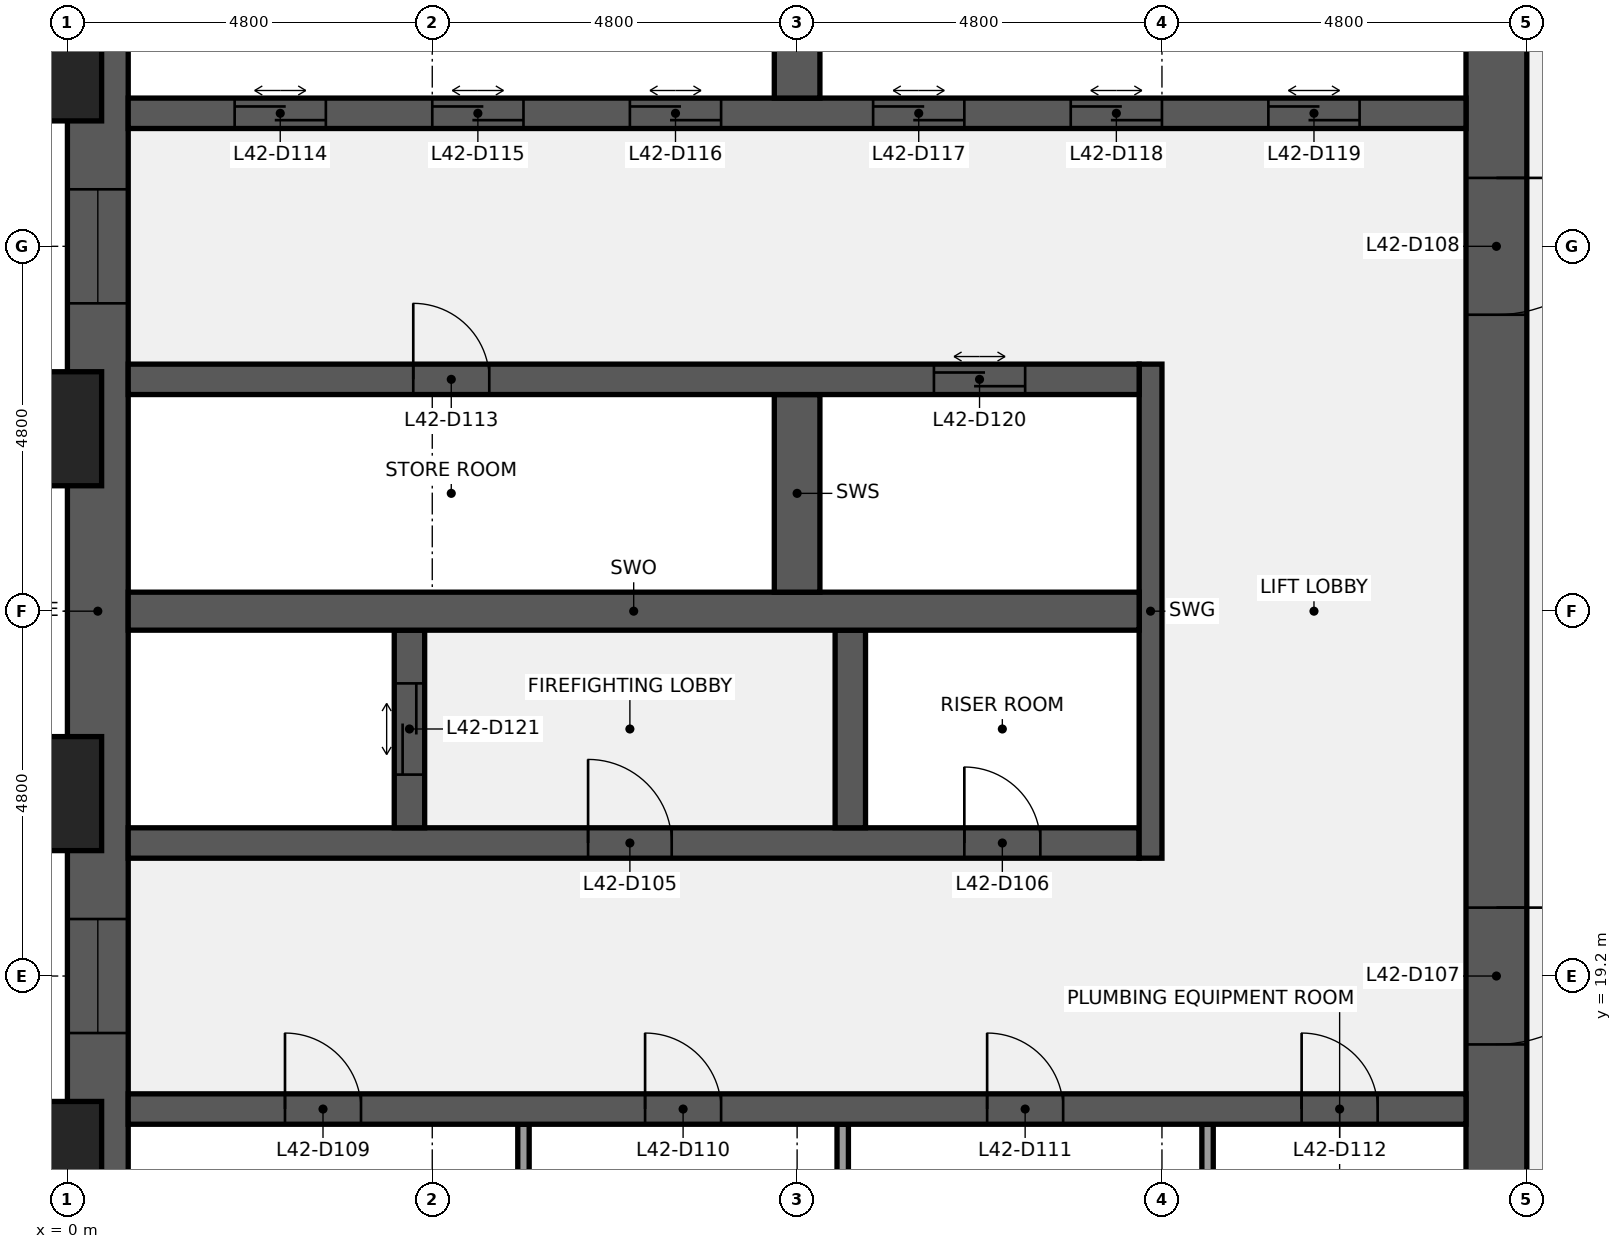
"""IFC4 building model, lengths in metres.
Left out: names, types, materials, properties, quantities, classifications, styles, units other than length and angle.
Written with IfcOpenShell. Run it as: python <this file> out.ifc"""

import sys

from ifc_helpers import new_model, si_unit, direction, frame, frame_2d, origin, origin_2d, place, context, subcontext, project, spatial, rectangle, extrude, element, fill, save


model = new_model("IFC4")
c1 = context("Model", 3, precision=1e-05, world=origin(), true_north=direction((0.0, 1.0)))
c2 = subcontext(c1, "Body", "Model", "MODEL_VIEW")
j1 = project(units=[si_unit("LENGTHUNIT", "METRE"), si_unit("PLANEANGLEUNIT", "RADIAN")], contexts=[c1])
p1 = place(None, origin())
s1 = spatial("IfcSite", under=j1, at=p1, CompositionType="ELEMENT")
p2 = place(p1, origin())
s2 = spatial("IfcBuilding", under=s1, at=p2, CompositionType="ELEMENT")
p3 = place(p2, frame((0.0, 0.0, 197.2)))
s3 = spatial("IfcBuildingStorey", under=s2, at=p3, CompositionType="ELEMENT", Elevation=197.2)
p4 = place(p3, frame((0.4, 9.6, 0.0), z_axis=(0.0, 0.0, 1.0), x_axis=(0.0, 1.0, 0.0)))
e1 = element("IfcWall", 1, at=p4, inside=s3, PredefinedType="SHEAR", context=c2, shape_type="SweptSolid", body=[
    extrude(rectangle(XDim=28.8, YDim=0.8, at=frame_2d((14.4, 0.0))), origin(), (0.0, 0.0, 1.0), 3.84),
])
p5 = place(p4, frame((8.85, 0.0, 0.9)))
e2 = element("IfcOpeningElement", 2, at=p5, cuts=e1, PredefinedType="OPENING", context=c2, shape_type="SweptSolid", body=[
    extrude(rectangle(XDim=1.5, YDim=1.5, at=frame_2d((0.75, 0.75))), frame((0.0, 0.41, 0.0), z_axis=(0.0, -1.0, 0.0), x_axis=(1.0, 0.0, 0.0)), (0.0, 0.0, 1.0), 0.82),
])
p6 = place(p4, frame((18.45, 0.0, 0.9)))
e3 = element("IfcOpeningElement", 3, at=p6, cuts=e1, PredefinedType="OPENING", context=c2, shape_type="SweptSolid", body=[
    extrude(rectangle(XDim=1.5, YDim=1.5, at=frame_2d((0.75, 0.75))), frame((0.0, 0.41, 0.0), z_axis=(0.0, -1.0, 0.0), x_axis=(1.0, 0.0, 0.0)), (0.0, 0.0, 1.0), 0.82),
])
p7 = place(p3, frame((18.8, 38.4, 0.0), z_axis=(0.0, 0.0, 1.0), x_axis=(0.0, -1.0, 0.0)))
e4 = element("IfcWall", 4, at=p7, inside=s3, PredefinedType="SHEAR", context=c2, shape_type="SweptSolid", body=[
    extrude(rectangle(XDim=28.8, YDim=0.8, at=frame_2d((14.4, 0.0))), origin(), (0.0, 0.0, 1.0), 3.84),
])
p8 = place(p7, frame((18.3, 0.0, 0.0)))
e5 = element("IfcOpeningElement", 5, at=p8, cuts=e4, PredefinedType="OPENING", context=c2, shape_type="SweptSolid", body=[
    extrude(rectangle(XDim=1.8, YDim=2.1, at=frame_2d((0.9, 1.05))), frame((0.0, 0.41, 0.0), z_axis=(0.0, -1.0, 0.0), x_axis=(1.0, 0.0, 0.0)), (0.0, 0.0, 1.0), 0.82),
])
p9 = place(p7, frame((8.7, 0.0, 0.0)))
e6 = element("IfcOpeningElement", 6, at=p9, cuts=e4, PredefinedType="OPENING", context=c2, shape_type="SweptSolid", body=[
    extrude(rectangle(XDim=1.8, YDim=2.1, at=frame_2d((0.9, 1.05))), frame((0.0, 0.41, 0.0), z_axis=(0.0, -1.0, 0.0), x_axis=(1.0, 0.0, 0.0)), (0.0, 0.0, 1.0), 0.82),
])
for number, where, z_axis, x_axis in (
    (7, (6.0, 14.65, 0.0), (0.0, 0.0, 1.0), (0.0, 1.0, 0.0)),
    (8, (10.2, 14.65, 0.0), (0.0, 0.0, 1.0), (0.0, 1.0, 0.0)),
    (9, (15.0, 14.65, 0.0), (0.0, 0.0, 1.0), (0.0, 1.0, 0.0)),
):
    element("IfcWall", number, at=place(p3, frame(where, z_axis=z_axis, x_axis=x_axis)), inside=s3, PredefinedType="PARTITIONING", context=c2, shape_type="SweptSolid", body=[
        extrude(rectangle(XDim=2.6, YDim=0.15, at=frame_2d((1.3, 0.0))), origin(), (0.0, 0.0, 1.0), 3.84),
    ])
p10 = place(p3, frame((0.8, 17.45, 0.0), z_axis=(0.0, 0.0, 1.0), x_axis=(1.0, 0.0, 0.0)))
e10 = element("IfcWall", 10, at=p10, inside=s3, PredefinedType="SHEAR", context=c2, shape_type="SweptSolid", body=[
    extrude(rectangle(XDim=17.6, YDim=0.4, at=frame_2d((8.8, 0.0))), origin(), (0.0, 0.0, 1.0), 3.84),
])
p11 = place(p10, frame((2.062, 0.0, 0.0)))
e11 = element("IfcOpeningElement", 11, at=p11, cuts=e10, PredefinedType="OPENING", context=c2, shape_type="SweptSolid", body=[
    extrude(rectangle(XDim=1.0, YDim=2.1, at=frame_2d((0.5, 1.05))), frame((0.0, 0.21, 0.0), z_axis=(0.0, -1.0, 0.0), x_axis=(1.0, 0.0, 0.0)), (0.0, 0.0, 1.0), 0.42),
])
p12 = place(p10, frame((6.8, 0.0, 0.0)))
e12 = element("IfcOpeningElement", 12, at=p12, cuts=e10, PredefinedType="OPENING", context=c2, shape_type="SweptSolid", body=[
    extrude(rectangle(XDim=1.0, YDim=2.1, at=frame_2d((0.5, 1.05))), frame((0.0, 0.21, 0.0), z_axis=(0.0, -1.0, 0.0), x_axis=(1.0, 0.0, 0.0)), (0.0, 0.0, 1.0), 0.42),
])
p13 = place(p10, frame((11.3, 0.0, 0.0)))
e13 = element("IfcOpeningElement", 13, at=p13, cuts=e10, PredefinedType="OPENING", context=c2, shape_type="SweptSolid", body=[
    extrude(rectangle(XDim=1.0, YDim=2.1, at=frame_2d((0.5, 1.05))), frame((0.0, 0.21, 0.0), z_axis=(0.0, -1.0, 0.0), x_axis=(1.0, 0.0, 0.0)), (0.0, 0.0, 1.0), 0.42),
])
p14 = place(p10, frame((15.438, 0.0, 0.0)))
e14 = element("IfcOpeningElement", 14, at=p14, cuts=e10, PredefinedType="OPENING", context=c2, shape_type="SweptSolid", body=[
    extrude(rectangle(XDim=1.0, YDim=2.1, at=frame_2d((0.5, 1.05))), frame((0.0, 0.21, 0.0), z_axis=(0.0, -1.0, 0.0), x_axis=(1.0, 0.0, 0.0)), (0.0, 0.0, 1.0), 0.42),
])
p15 = place(p3, frame((0.8, 20.95, 0.0), z_axis=(0.0, 0.0, 1.0), x_axis=(1.0, 0.0, 0.0)))
e15 = element("IfcWall", 15, at=p15, inside=s3, PredefinedType="SHEAR", context=c2, shape_type="SweptSolid", body=[
    extrude(rectangle(XDim=13.3, YDim=0.4, at=frame_2d((6.65, 0.0))), origin(), (0.0, 0.0, 1.0), 3.84),
])
p16 = place(p15, frame((6.05, 0.0, 0.0)))
e16 = element("IfcOpeningElement", 16, at=p16, cuts=e15, PredefinedType="OPENING", context=c2, shape_type="SweptSolid", body=[
    extrude(rectangle(XDim=1.1, YDim=2.1, at=frame_2d((0.55, 1.05))), frame((0.0, 0.21, 0.0), z_axis=(0.0, -1.0, 0.0), x_axis=(1.0, 0.0, 0.0)), (0.0, 0.0, 1.0), 0.42),
])
p17 = place(p15, frame((11.0, 0.0, 0.0)))
e17 = element("IfcOpeningElement", 17, at=p17, cuts=e15, PredefinedType="OPENING", context=c2, shape_type="SweptSolid", body=[
    extrude(rectangle(XDim=1.0, YDim=2.1, at=frame_2d((0.5, 1.05))), frame((0.0, 0.21, 0.0), z_axis=(0.0, -1.0, 0.0), x_axis=(1.0, 0.0, 0.0)), (0.0, 0.0, 1.0), 0.42),
])
p18 = place(p3, frame((14.25, 20.75, 0.0), z_axis=(0.0, 0.0, 1.0), x_axis=(0.0, 1.0, 0.0)))
e18 = element("IfcWall", 18, at=p18, inside=s3, PredefinedType="SHEAR", context=c2, shape_type="SweptSolid", body=[
    extrude(rectangle(XDim=6.5, YDim=0.3, at=frame_2d((3.25, 0.0))), origin(), (0.0, 0.0, 1.0), 3.84),
])
p19 = place(p3, frame((4.5, 21.15, 0.0), z_axis=(0.0, 0.0, 1.0), x_axis=(0.0, 1.0, 0.0)))
e19 = element("IfcWall", 19, at=p19, inside=s3, PredefinedType="SHEAR", context=c2, shape_type="SweptSolid", body=[
    extrude(rectangle(XDim=2.6, YDim=0.4, at=frame_2d((1.3, 0.0))), origin(), (0.0, 0.0, 1.0), 3.84),
])
p20 = place(p19, frame((0.7, 0.0, 0.0)))
e20 = element("IfcOpeningElement", 20, at=p20, cuts=e19, PredefinedType="OPENING", context=c2, shape_type="SweptSolid", body=[
    extrude(rectangle(XDim=1.2, YDim=2.1, at=frame_2d((0.6, 1.05))), frame((0.0, 0.21, 0.0), z_axis=(0.0, -1.0, 0.0), x_axis=(1.0, 0.0, 0.0)), (0.0, 0.0, 1.0), 0.42),
])
p21 = place(p3, frame((10.3, 21.15, 0.0), z_axis=(0.0, 0.0, 1.0), x_axis=(0.0, 1.0, 0.0)))
e21 = element("IfcWall", 21, at=p21, inside=s3, PredefinedType="SHEAR", context=c2, shape_type="SweptSolid", body=[
    extrude(rectangle(XDim=2.6, YDim=0.4, at=frame_2d((1.3, 0.0))), origin(), (0.0, 0.0, 1.0), 3.84),
])
p22 = place(p3, frame((0.8, 24.0, 0.0), z_axis=(0.0, 0.0, 1.0), x_axis=(1.0, 0.0, 0.0)))
e22 = element("IfcWall", 22, at=p22, inside=s3, PredefinedType="SHEAR", context=c2, shape_type="SweptSolid", body=[
    extrude(rectangle(XDim=13.3, YDim=0.5, at=frame_2d((6.65, 0.0))), origin(), (0.0, 0.0, 1.0), 3.84),
])
p23 = place(p3, frame((9.6, 24.25, 0.0), z_axis=(0.0, 0.0, 1.0), x_axis=(0.0, 1.0, 0.0)))
e23 = element("IfcWall", 23, at=p23, inside=s3, PredefinedType="SHEAR", context=c2, shape_type="SweptSolid", body=[
    extrude(rectangle(XDim=2.6, YDim=0.6, at=frame_2d((1.3, 0.0))), origin(), (0.0, 0.0, 1.0), 3.84),
])
p24 = place(p3, frame((0.8, 27.05, 0.0), z_axis=(0.0, 0.0, 1.0), x_axis=(1.0, 0.0, 0.0)))
e24 = element("IfcWall", 24, at=p24, inside=s3, PredefinedType="SHEAR", context=c2, shape_type="SweptSolid", body=[
    extrude(rectangle(XDim=13.3, YDim=0.4, at=frame_2d((6.65, 0.0))), origin(), (0.0, 0.0, 1.0), 3.84),
])
p25 = place(p24, frame((3.75, 0.0, 0.0)))
e25 = element("IfcOpeningElement", 25, at=p25, cuts=e24, PredefinedType="OPENING", context=c2, shape_type="SweptSolid", body=[
    extrude(rectangle(XDim=1.0, YDim=2.1, at=frame_2d((0.5, 1.05))), frame((0.0, 0.21, 0.0), z_axis=(0.0, -1.0, 0.0), x_axis=(1.0, 0.0, 0.0)), (0.0, 0.0, 1.0), 0.42),
])
p26 = place(p24, frame((10.6, 0.0, 0.0)))
e26 = element("IfcOpeningElement", 26, at=p26, cuts=e24, PredefinedType="OPENING", context=c2, shape_type="SweptSolid", body=[
    extrude(rectangle(XDim=1.2, YDim=2.1, at=frame_2d((0.6, 1.05))), frame((0.0, 0.21, 0.0), z_axis=(0.0, -1.0, 0.0), x_axis=(1.0, 0.0, 0.0)), (0.0, 0.0, 1.0), 0.42),
])
p27 = place(p3, frame((0.8, 30.55, 0.0), z_axis=(0.0, 0.0, 1.0), x_axis=(1.0, 0.0, 0.0)))
e27 = element("IfcWall", 27, at=p27, inside=s3, PredefinedType="SHEAR", context=c2, shape_type="SweptSolid", body=[
    extrude(rectangle(XDim=17.6, YDim=0.4, at=frame_2d((8.8, 0.0))), origin(), (0.0, 0.0, 1.0), 3.84),
])
p28 = place(p27, frame((1.4, 0.0, 0.0)))
e28 = element("IfcOpeningElement", 28, at=p28, cuts=e27, PredefinedType="OPENING", context=c2, shape_type="SweptSolid", body=[
    extrude(rectangle(XDim=1.2, YDim=2.1, at=frame_2d((0.6, 1.05))), frame((0.0, 0.21, 0.0), z_axis=(0.0, -1.0, 0.0), x_axis=(1.0, 0.0, 0.0)), (0.0, 0.0, 1.0), 0.42),
])
p29 = place(p27, frame((4.0, 0.0, 0.0)))
e29 = element("IfcOpeningElement", 29, at=p29, cuts=e27, PredefinedType="OPENING", context=c2, shape_type="SweptSolid", body=[
    extrude(rectangle(XDim=1.2, YDim=2.1, at=frame_2d((0.6, 1.05))), frame((0.0, 0.21, 0.0), z_axis=(0.0, -1.0, 0.0), x_axis=(1.0, 0.0, 0.0)), (0.0, 0.0, 1.0), 0.42),
])
p30 = place(p27, frame((6.6, 0.0, 0.0)))
e30 = element("IfcOpeningElement", 30, at=p30, cuts=e27, PredefinedType="OPENING", context=c2, shape_type="SweptSolid", body=[
    extrude(rectangle(XDim=1.2, YDim=2.1, at=frame_2d((0.6, 1.05))), frame((0.0, 0.21, 0.0), z_axis=(0.0, -1.0, 0.0), x_axis=(1.0, 0.0, 0.0)), (0.0, 0.0, 1.0), 0.42),
])
p31 = place(p27, frame((9.8, 0.0, 0.0)))
e31 = element("IfcOpeningElement", 31, at=p31, cuts=e27, PredefinedType="OPENING", context=c2, shape_type="SweptSolid", body=[
    extrude(rectangle(XDim=1.2, YDim=2.1, at=frame_2d((0.6, 1.05))), frame((0.0, 0.21, 0.0), z_axis=(0.0, -1.0, 0.0), x_axis=(1.0, 0.0, 0.0)), (0.0, 0.0, 1.0), 0.42),
])
p32 = place(p27, frame((12.4, 0.0, 0.0)))
e32 = element("IfcOpeningElement", 32, at=p32, cuts=e27, PredefinedType="OPENING", context=c2, shape_type="SweptSolid", body=[
    extrude(rectangle(XDim=1.2, YDim=2.1, at=frame_2d((0.6, 1.05))), frame((0.0, 0.21, 0.0), z_axis=(0.0, -1.0, 0.0), x_axis=(1.0, 0.0, 0.0)), (0.0, 0.0, 1.0), 0.42),
])
p33 = place(p27, frame((15.0, 0.0, 0.0)))
e33 = element("IfcOpeningElement", 33, at=p33, cuts=e27, PredefinedType="OPENING", context=c2, shape_type="SweptSolid", body=[
    extrude(rectangle(XDim=1.2, YDim=2.1, at=frame_2d((0.6, 1.05))), frame((0.0, 0.21, 0.0), z_axis=(0.0, -1.0, 0.0), x_axis=(1.0, 0.0, 0.0)), (0.0, 0.0, 1.0), 0.42),
])
p34 = place(p3, frame((9.6, 30.75, 0.0), z_axis=(0.0, 0.0, 1.0), x_axis=(0.0, 1.0, 0.0)))
e34 = element("IfcWall", 34, at=p34, inside=s3, PredefinedType="SHEAR", context=c2, shape_type="SweptSolid", body=[
    extrude(rectangle(XDim=2.6, YDim=0.6, at=frame_2d((1.3, 0.0))), origin(), (0.0, 0.0, 1.0), 3.84),
])
for number, where, z_axis, x_axis in (
    (35, (-0.75, 16.8, 0.0), (0.0, 0.0, 1.0), (0.0, 1.0, 0.0)),
    (36, (-0.75, 21.6, 0.0), (0.0, 0.0, 1.0), (0.0, 1.0, 0.0)),
    (37, (-0.75, 26.4, 0.0), (0.0, 0.0, 1.0), (0.0, 1.0, 0.0)),
    (38, (-0.75, 31.2, 0.0), (0.0, 0.0, 1.0), (0.0, 1.0, 0.0)),
):
    element("IfcColumn", number, at=place(p3, frame(where, z_axis=z_axis, x_axis=x_axis)), inside=s3, PredefinedType="PILASTER", context=c2, shape_type="SweptSolid", body=[
        extrude(rectangle(XDim=2.4, YDim=1.5, at=origin_2d()), origin(), (0.0, 0.0, 1.0), 4.0),
    ])
p35 = place(p16, origin())
e39 = element("IfcDoor", 39, at=p35, inside=s3, OperationType="SINGLE_SWING_LEFT", PredefinedType="DOOR", context=c2, shape_type="SweptSolid", body=[
    extrude(rectangle(XDim=1.1, YDim=2.1, at=frame_2d((0.55, 1.05))), frame((0.0, 0.025, 0.0), z_axis=(0.0, -1.0, 0.0), x_axis=(1.0, 0.0, 0.0)), (0.0, 0.0, 1.0), 0.05),
])
fill(e16, e39)
p36 = place(p17, origin())
e40 = element("IfcDoor", 40, at=p36, inside=s3, OperationType="SINGLE_SWING_LEFT", PredefinedType="DOOR", context=c2, shape_type="SweptSolid", body=[
    extrude(rectangle(XDim=1.0, YDim=2.1, at=frame_2d((0.5, 1.05))), frame((0.0, 0.025, 0.0), z_axis=(0.0, -1.0, 0.0), x_axis=(1.0, 0.0, 0.0)), (0.0, 0.0, 1.0), 0.05),
])
fill(e17, e40)
p37 = place(p8, origin())
e41 = element("IfcDoor", 41, at=p37, inside=s3, OperationType="DOUBLE_DOOR_SINGLE_SWING", PredefinedType="DOOR", context=c2, shape_type="SweptSolid", body=[
    extrude(rectangle(XDim=1.8, YDim=2.1, at=frame_2d((0.9, 1.05))), frame((0.0, 0.025, 0.0), z_axis=(0.0, -1.0, 0.0), x_axis=(1.0, 0.0, 0.0)), (0.0, 0.0, 1.0), 0.05),
])
fill(e5, e41)
p38 = place(p9, origin())
e42 = element("IfcDoor", 42, at=p38, inside=s3, OperationType="DOUBLE_DOOR_SINGLE_SWING", PredefinedType="DOOR", context=c2, shape_type="SweptSolid", body=[
    extrude(rectangle(XDim=1.8, YDim=2.1, at=frame_2d((0.9, 1.05))), frame((0.0, 0.025, 0.0), z_axis=(0.0, -1.0, 0.0), x_axis=(1.0, 0.0, 0.0)), (0.0, 0.0, 1.0), 0.05),
])
fill(e6, e42)
p39 = place(p11, origin())
e43 = element("IfcDoor", 43, at=p39, inside=s3, OperationType="SINGLE_SWING_LEFT", PredefinedType="DOOR", context=c2, shape_type="SweptSolid", body=[
    extrude(rectangle(XDim=1.0, YDim=2.1, at=frame_2d((0.5, 1.05))), frame((0.0, 0.025, 0.0), z_axis=(0.0, -1.0, 0.0), x_axis=(1.0, 0.0, 0.0)), (0.0, 0.0, 1.0), 0.05),
])
fill(e11, e43)
p40 = place(p12, origin())
e44 = element("IfcDoor", 44, at=p40, inside=s3, OperationType="SINGLE_SWING_LEFT", PredefinedType="DOOR", context=c2, shape_type="SweptSolid", body=[
    extrude(rectangle(XDim=1.0, YDim=2.1, at=frame_2d((0.5, 1.05))), frame((0.0, 0.025, 0.0), z_axis=(0.0, -1.0, 0.0), x_axis=(1.0, 0.0, 0.0)), (0.0, 0.0, 1.0), 0.05),
])
fill(e12, e44)
p41 = place(p13, origin())
e45 = element("IfcDoor", 45, at=p41, inside=s3, OperationType="SINGLE_SWING_LEFT", PredefinedType="DOOR", context=c2, shape_type="SweptSolid", body=[
    extrude(rectangle(XDim=1.0, YDim=2.1, at=frame_2d((0.5, 1.05))), frame((0.0, 0.025, 0.0), z_axis=(0.0, -1.0, 0.0), x_axis=(1.0, 0.0, 0.0)), (0.0, 0.0, 1.0), 0.05),
])
fill(e13, e45)
p42 = place(p14, origin())
e46 = element("IfcDoor", 46, at=p42, inside=s3, OperationType="SINGLE_SWING_LEFT", PredefinedType="DOOR", context=c2, shape_type="SweptSolid", body=[
    extrude(rectangle(XDim=1.0, YDim=2.1, at=frame_2d((0.5, 1.05))), frame((0.0, 0.025, 0.0), z_axis=(0.0, -1.0, 0.0), x_axis=(1.0, 0.0, 0.0)), (0.0, 0.0, 1.0), 0.05),
])
fill(e14, e46)
p43 = place(p25, origin())
e47 = element("IfcDoor", 47, at=p43, inside=s3, OperationType="SINGLE_SWING_LEFT", PredefinedType="DOOR", context=c2, shape_type="SweptSolid", body=[
    extrude(rectangle(XDim=1.0, YDim=2.1, at=frame_2d((0.5, 1.05))), frame((0.0, 0.025, 0.0), z_axis=(0.0, -1.0, 0.0), x_axis=(1.0, 0.0, 0.0)), (0.0, 0.0, 1.0), 0.05),
])
fill(e25, e47)
p44 = place(p28, origin())
e48 = element("IfcDoor", 48, at=p44, inside=s3, OperationType="DOUBLE_DOOR_SLIDING", PredefinedType="DOOR", context=c2, shape_type="SweptSolid", body=[
    extrude(rectangle(XDim=1.2, YDim=2.1, at=frame_2d((0.6, 1.05))), frame((0.0, 0.025, 0.0), z_axis=(0.0, -1.0, 0.0), x_axis=(1.0, 0.0, 0.0)), (0.0, 0.0, 1.0), 0.05),
])
fill(e28, e48)
p45 = place(p29, origin())
e49 = element("IfcDoor", 49, at=p45, inside=s3, OperationType="DOUBLE_DOOR_SLIDING", PredefinedType="DOOR", context=c2, shape_type="SweptSolid", body=[
    extrude(rectangle(XDim=1.2, YDim=2.1, at=frame_2d((0.6, 1.05))), frame((0.0, 0.025, 0.0), z_axis=(0.0, -1.0, 0.0), x_axis=(1.0, 0.0, 0.0)), (0.0, 0.0, 1.0), 0.05),
])
fill(e29, e49)
p46 = place(p30, origin())
e50 = element("IfcDoor", 50, at=p46, inside=s3, OperationType="DOUBLE_DOOR_SLIDING", PredefinedType="DOOR", context=c2, shape_type="SweptSolid", body=[
    extrude(rectangle(XDim=1.2, YDim=2.1, at=frame_2d((0.6, 1.05))), frame((0.0, 0.025, 0.0), z_axis=(0.0, -1.0, 0.0), x_axis=(1.0, 0.0, 0.0)), (0.0, 0.0, 1.0), 0.05),
])
fill(e30, e50)
p47 = place(p31, origin())
e51 = element("IfcDoor", 51, at=p47, inside=s3, OperationType="DOUBLE_DOOR_SLIDING", PredefinedType="DOOR", context=c2, shape_type="SweptSolid", body=[
    extrude(rectangle(XDim=1.2, YDim=2.1, at=frame_2d((0.6, 1.05))), frame((0.0, 0.025, 0.0), z_axis=(0.0, -1.0, 0.0), x_axis=(1.0, 0.0, 0.0)), (0.0, 0.0, 1.0), 0.05),
])
fill(e31, e51)
p48 = place(p32, origin())
e52 = element("IfcDoor", 52, at=p48, inside=s3, OperationType="DOUBLE_DOOR_SLIDING", PredefinedType="DOOR", context=c2, shape_type="SweptSolid", body=[
    extrude(rectangle(XDim=1.2, YDim=2.1, at=frame_2d((0.6, 1.05))), frame((0.0, 0.025, 0.0), z_axis=(0.0, -1.0, 0.0), x_axis=(1.0, 0.0, 0.0)), (0.0, 0.0, 1.0), 0.05),
])
fill(e32, e52)
p49 = place(p33, origin())
e53 = element("IfcDoor", 53, at=p49, inside=s3, OperationType="DOUBLE_DOOR_SLIDING", PredefinedType="DOOR", context=c2, shape_type="SweptSolid", body=[
    extrude(rectangle(XDim=1.2, YDim=2.1, at=frame_2d((0.6, 1.05))), frame((0.0, 0.025, 0.0), z_axis=(0.0, -1.0, 0.0), x_axis=(1.0, 0.0, 0.0)), (0.0, 0.0, 1.0), 0.05),
])
fill(e33, e53)
p50 = place(p26, origin())
e54 = element("IfcDoor", 54, at=p50, inside=s3, OperationType="DOUBLE_DOOR_SLIDING", PredefinedType="DOOR", context=c2, shape_type="SweptSolid", body=[
    extrude(rectangle(XDim=1.2, YDim=2.1, at=frame_2d((0.6, 1.05))), frame((0.0, 0.025, 0.0), z_axis=(0.0, -1.0, 0.0), x_axis=(1.0, 0.0, 0.0)), (0.0, 0.0, 1.0), 0.05),
])
fill(e26, e54)
p51 = place(p20, origin())
e55 = element("IfcDoor", 55, at=p51, inside=s3, OperationType="DOUBLE_DOOR_SLIDING", PredefinedType="DOOR", context=c2, shape_type="SweptSolid", body=[
    extrude(rectangle(XDim=1.2, YDim=2.1, at=frame_2d((0.6, 1.05))), frame((0.0, 0.025, 0.0), z_axis=(0.0, -1.0, 0.0), x_axis=(1.0, 0.0, 0.0)), (0.0, 0.0, 1.0), 0.05),
])
fill(e20, e55)
p52 = place(p5, origin())
e56 = element("IfcWindow", 56, at=p52, inside=s3, PartitioningType="SINGLE_PANEL", PredefinedType="WINDOW", context=c2, shape_type="SweptSolid", body=[
    extrude(rectangle(XDim=1.5, YDim=1.5, at=frame_2d((0.75, 0.75))), frame((0.0, 0.03, 0.0), z_axis=(0.0, -1.0, 0.0), x_axis=(1.0, 0.0, 0.0)), (0.0, 0.0, 1.0), 0.06),
])
fill(e2, e56)
p53 = place(p6, origin())
e57 = element("IfcWindow", 57, at=p53, inside=s3, PartitioningType="SINGLE_PANEL", PredefinedType="WINDOW", context=c2, shape_type="SweptSolid", body=[
    extrude(rectangle(XDim=1.5, YDim=1.5, at=frame_2d((0.75, 0.75))), frame((0.0, 0.03, 0.0), z_axis=(0.0, -1.0, 0.0), x_axis=(1.0, 0.0, 0.0)), (0.0, 0.0, 1.0), 0.06),
])
fill(e3, e57)
save(model, sys.argv[1])
